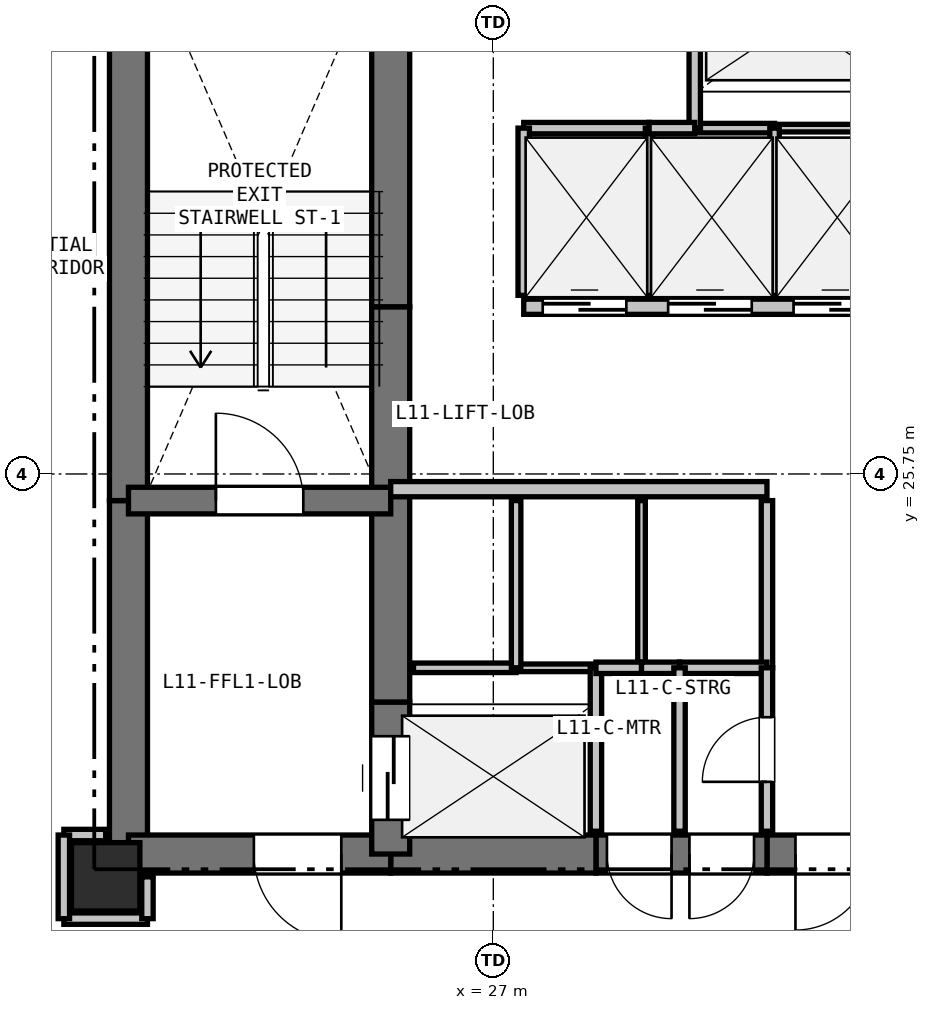
"""IFC4 building model, lengths in metres.
Left out: names, types, materials, properties, quantities, classifications, styles, units other than length and angle.
Written with IfcOpenShell. Run it as: python <this file> out.ifc"""

import sys

from ifc_helpers import new_model, si_unit, direction, frame, frame_2d, origin, origin_2d, place, context, subcontext, project, spatial, rectangle, extrude, element, fill, save


model = new_model("IFC4")
c1 = context("Model", 3, precision=1e-05, world=origin(), true_north=direction((0.0, 1.0)))
c2 = subcontext(c1, "Body", "Model", "MODEL_VIEW")
j1 = project(units=[si_unit("LENGTHUNIT", "METRE"), si_unit("PLANEANGLEUNIT", "RADIAN")], contexts=[c1])
p1 = place(None, origin())
s1 = spatial("IfcSite", under=j1, at=p1, CompositionType="ELEMENT")
p2 = place(p1, origin())
s2 = spatial("IfcBuilding", under=s1, at=p2, CompositionType="ELEMENT")
p3 = place(p2, frame((0.0, 0.0, 42.3)))
s3 = spatial("IfcBuildingStorey", under=s2, at=p3, CompositionType="ELEMENT", Elevation=42.3)
p4 = place(p3, frame((21.9, 20.45, 0.0), z_axis=(0.0, 0.0, 1.0), x_axis=(1.0, 0.0, 0.0)))
e1 = element("IfcColumn", 1, at=p4, inside=s3, PredefinedType="COLUMN", context=c2, shape_type="SweptSolid", body=[
    extrude(rectangle(XDim=0.9, YDim=0.9, at=origin_2d()), origin(), (0.0, 0.0, 1.0), 3.3),
])
p5 = place(p3, frame((22.2, 20.75, 0.0), z_axis=(0.0, 0.0, 1.0), x_axis=(0.0, 1.0, 0.0)))
e2 = element("IfcWall", 2, at=p5, inside=s3, PredefinedType="SHEAR", context=c2, shape_type="SweptSolid", body=[
    extrude(rectangle(XDim=4.65, YDim=0.5, at=frame_2d((2.325, 0.0))), origin(), (0.0, 0.0, 1.0), 3.04),
])
p6 = place(p3, frame((22.2, 25.4, 0.0), z_axis=(0.0, 0.0, 1.0), x_axis=(0.0, 1.0, 0.0)))
e3 = element("IfcWall", 3, at=p6, inside=s3, PredefinedType="SHEAR", context=c2, shape_type="SweptSolid", body=[
    extrude(rectangle(XDim=7.35, YDim=0.5, at=frame_2d((3.675, 0.0))), origin(), (0.0, 0.0, 1.0), 3.04),
])
p7 = place(p3, frame((32.35, 20.75, 0.0), z_axis=(0.0, 0.0, 1.0), x_axis=(-1.0, 0.0, 0.0)))
e4 = element("IfcWall", 4, at=p7, inside=s3, PredefinedType="SHEAR", context=c2, shape_type="SweptSolid", body=[
    extrude(rectangle(XDim=1.75, YDim=0.5, at=frame_2d((0.875, 0.0))), origin(), (0.0, 0.0, 1.0), 3.04),
])
p8 = place(p7, frame((0.375, 0.0, 0.0)))
e5 = element("IfcOpeningElement", 5, at=p8, cuts=e4, PredefinedType="OPENING", context=c2, shape_type="SweptSolid", body=[
    extrude(rectangle(XDim=1.0, YDim=2.15, at=frame_2d((0.5, 1.075))), frame((0.0, 0.26, 0.0), z_axis=(0.0, -1.0, 0.0), x_axis=(1.0, 0.0, 0.0)), (0.0, 0.0, 1.0), 0.52),
])
p9 = place(p3, frame((30.6, 20.75, 0.0), z_axis=(0.0, 0.0, 1.0), x_axis=(-1.0, 0.0, 0.0)))
e6 = element("IfcWall", 6, at=p9, inside=s3, PredefinedType="SHEAR", context=c2, shape_type="SweptSolid", body=[
    extrude(rectangle(XDim=2.25, YDim=0.5, at=frame_2d((1.125, 0.0))), origin(), (0.0, 0.0, 1.0), 3.04),
])
p10 = place(p9, frame((1.255, 0.0, 0.0)))
e7 = element("IfcOpeningElement", 7, at=p10, cuts=e6, PredefinedType="OPENING", context=c2, shape_type="SweptSolid", body=[
    extrude(rectangle(XDim=0.85, YDim=2.1, at=frame_2d((0.425, 1.05))), frame((0.0, 0.26, 0.0), z_axis=(0.0, -1.0, 0.0), x_axis=(1.0, 0.0, 0.0)), (0.0, 0.0, 1.0), 0.52),
])
p11 = place(p9, frame((0.17, 0.0, 0.0)))
e8 = element("IfcOpeningElement", 8, at=p11, cuts=e6, PredefinedType="OPENING", context=c2, shape_type="SweptSolid", body=[
    extrude(rectangle(XDim=0.85, YDim=2.1, at=frame_2d((0.425, 1.05))), frame((0.0, 0.26, 0.0), z_axis=(0.0, -1.0, 0.0), x_axis=(1.0, 0.0, 0.0)), (0.0, 0.0, 1.0), 0.52),
])
p12 = place(p3, frame((28.35, 20.75, 0.0), z_axis=(0.0, 0.0, 1.0), x_axis=(-1.0, 0.0, 0.0)))
e9 = element("IfcWall", 9, at=p12, inside=s3, PredefinedType="SHEAR", context=c2, shape_type="SweptSolid", body=[
    extrude(rectangle(XDim=2.7, YDim=0.5, at=frame_2d((1.35, 0.0))), origin(), (0.0, 0.0, 1.0), 3.04),
])
p13 = place(p3, frame((25.65, 20.75, 0.0), z_axis=(0.0, 0.0, 1.0), x_axis=(-1.0, 0.0, 0.0)))
e10 = element("IfcWall", 10, at=p13, inside=s3, PredefinedType="SHEAR", context=c2, shape_type="SweptSolid", body=[
    extrude(rectangle(XDim=3.45, YDim=0.5, at=frame_2d((1.725, 0.0))), origin(), (0.0, 0.0, 1.0), 3.04),
])
p14 = place(p13, frame((0.65, 0.0, 0.0)))
e11 = element("IfcOpeningElement", 11, at=p14, cuts=e10, PredefinedType="OPENING", context=c2, shape_type="SweptSolid", body=[
    extrude(rectangle(XDim=1.15, YDim=2.15, at=frame_2d((0.575, 1.075))), frame((0.0, 0.26, 0.0), z_axis=(0.0, -1.0, 0.0), x_axis=(1.0, 0.0, 0.0)), (0.0, 0.0, 1.0), 0.52),
])
p15 = place(p3, frame((25.65, 20.75, 0.0), z_axis=(0.0, 0.0, 1.0), x_axis=(0.0, 1.0, 0.0)))
e12 = element("IfcWall", 12, at=p15, inside=s3, PredefinedType="SHEAR", context=c2, shape_type="SweptSolid", body=[
    extrude(rectangle(XDim=2.0, YDim=0.5, at=frame_2d((1.0, 0.0))), origin(), (0.0, 0.0, 1.0), 3.04),
])
p16 = place(p15, frame((0.45, 0.0, 0.0)))
e13 = element("IfcOpeningElement", 13, at=p16, cuts=e12, PredefinedType="OPENING", context=c2, shape_type="SweptSolid", body=[
    extrude(rectangle(XDim=1.1, YDim=2.15, at=frame_2d((0.55, 1.075))), frame((0.0, 0.26, 0.0), z_axis=(0.0, -1.0, 0.0), x_axis=(1.0, 0.0, 0.0)), (0.0, 0.0, 1.0), 0.52),
])
p17 = place(p3, frame((25.65, 22.75, 0.0), z_axis=(0.0, 0.0, 1.0), x_axis=(0.0, 1.0, 0.0)))
e14 = element("IfcWall", 14, at=p17, inside=s3, PredefinedType="SHEAR", context=c2, shape_type="SweptSolid", body=[
    extrude(rectangle(XDim=2.8, YDim=0.5, at=frame_2d((1.4, 0.0))), origin(), (0.0, 0.0, 1.0), 3.04),
])
p18 = place(p3, frame((25.65, 25.55, 0.0), z_axis=(0.0, 0.0, 1.0), x_axis=(0.0, 1.0, 0.0)))
e15 = element("IfcWall", 15, at=p18, inside=s3, PredefinedType="SHEAR", context=c2, shape_type="SweptSolid", body=[
    extrude(rectangle(XDim=2.4, YDim=0.5, at=frame_2d((1.2, 0.0))), origin(), (0.0, 0.0, 1.0), 3.04),
])
p19 = place(p3, frame((25.65, 27.95, 0.0), z_axis=(0.0, 0.0, 1.0), x_axis=(0.0, 1.0, 0.0)))
e16 = element("IfcWall", 16, at=p19, inside=s3, PredefinedType="SHEAR", context=c2, shape_type="SweptSolid", body=[
    extrude(rectangle(XDim=4.8, YDim=0.5, at=frame_2d((2.4, 0.0))), origin(), (0.0, 0.0, 1.0), 3.04),
])
p20 = place(p3, frame((22.2, 25.4, 0.0), z_axis=(0.0, 0.0, 1.0), x_axis=(1.0, 0.0, 0.0)))
e17 = element("IfcWall", 17, at=p20, inside=s3, PredefinedType="SHEAR", context=c2, shape_type="SweptSolid", body=[
    extrude(rectangle(XDim=3.45, YDim=0.35, at=frame_2d((1.725, 0.0))), origin(), (0.0, 0.0, 1.0), 3.04),
])
p21 = place(p20, frame((1.15, 0.0, 0.0)))
e18 = element("IfcOpeningElement", 18, at=p21, cuts=e17, PredefinedType="OPENING", context=c2, shape_type="SweptSolid", body=[
    extrude(rectangle(XDim=1.15, YDim=2.15, at=frame_2d((0.575, 1.075))), frame((0.0, 0.185, 0.0), z_axis=(0.0, -1.0, 0.0), x_axis=(1.0, 0.0, 0.0)), (0.0, 0.0, 1.0), 0.37),
])
p22 = place(p3, frame((25.65, 25.55, 0.0), z_axis=(0.0, 0.0, 1.0), x_axis=(1.0, 0.0, 0.0)))
e19 = element("IfcWall", 19, at=p22, inside=s3, PredefinedType="PARTITIONING", context=c2, shape_type="SweptSolid", body=[
    extrude(rectangle(XDim=4.95, YDim=0.2, at=frame_2d((2.475, 0.0))), origin(), (0.0, 0.0, 1.0), 3.04),
])
p23 = place(p3, frame((27.4, 27.95, 0.0), z_axis=(0.0, 0.0, 1.0), x_axis=(1.0, 0.0, 0.0)))
e20 = element("IfcWall", 20, at=p23, inside=s3, PredefinedType="PARTITIONING", context=c2, shape_type="SweptSolid", body=[
    extrude(rectangle(XDim=4.95, YDim=0.2, at=frame_2d((2.475, 0.0))), origin(), (0.0, 0.0, 1.0), 3.04),
])
p24 = place(p23, frame((0.25, 0.0, 0.0)))
e21 = element("IfcOpeningElement", 21, at=p24, cuts=e20, PredefinedType="OPENING", context=c2, shape_type="SweptSolid", body=[
    extrude(rectangle(XDim=1.1, YDim=2.15, at=frame_2d((0.55, 1.075))), frame((0.0, 0.11, 0.0), z_axis=(0.0, -1.0, 0.0), x_axis=(1.0, 0.0, 0.0)), (0.0, 0.0, 1.0), 0.22),
])
p25 = place(p23, frame((1.9, 0.0, 0.0)))
e22 = element("IfcOpeningElement", 22, at=p25, cuts=e20, PredefinedType="OPENING", context=c2, shape_type="SweptSolid", body=[
    extrude(rectangle(XDim=1.1, YDim=2.15, at=frame_2d((0.55, 1.075))), frame((0.0, 0.11, 0.0), z_axis=(0.0, -1.0, 0.0), x_axis=(1.0, 0.0, 0.0)), (0.0, 0.0, 1.0), 0.22),
])
p26 = place(p23, frame((3.55, 0.0, 0.0)))
e23 = element("IfcOpeningElement", 23, at=p26, cuts=e20, PredefinedType="OPENING", context=c2, shape_type="SweptSolid", body=[
    extrude(rectangle(XDim=1.1, YDim=2.15, at=frame_2d((0.55, 1.075))), frame((0.0, 0.11, 0.0), z_axis=(0.0, -1.0, 0.0), x_axis=(1.0, 0.0, 0.0)), (0.0, 0.0, 1.0), 0.22),
])
p27 = place(p3, frame((25.95, 23.2, 0.0), z_axis=(0.0, 0.0, 1.0), x_axis=(1.0, 0.0, 0.0)))
e24 = element("IfcWall", 24, at=p27, inside=s3, PredefinedType="PARTITIONING", context=c2, shape_type="SweptSolid", body=[
    extrude(rectangle(XDim=1.35, YDim=0.125, at=frame_2d((0.675, 0.0))), origin(), (0.0, 0.0, 1.0), 3.04),
])
p28 = place(p3, frame((27.3, 23.2, 0.0), z_axis=(0.0, 0.0, 1.0), x_axis=(1.0, 0.0, 0.0)))
e25 = element("IfcWall", 25, at=p28, inside=s3, PredefinedType="PARTITIONING", context=c2, shape_type="SweptSolid", body=[
    extrude(rectangle(XDim=1.05, YDim=0.1, at=frame_2d((0.525, 0.0))), origin(), (0.0, 0.0, 1.0), 3.04),
])
p29 = place(p3, frame((28.35, 23.2, 0.0), z_axis=(0.0, 0.0, 1.0), x_axis=(0.0, -1.0, 0.0)))
e26 = element("IfcWall", 26, at=p29, inside=s3, PredefinedType="PARTITIONING", context=c2, shape_type="SweptSolid", body=[
    extrude(rectangle(XDim=2.15, YDim=0.15, at=frame_2d((1.075, 0.0))), origin(), (0.0, 0.0, 1.0), 3.04),
])
p30 = place(p3, frame((32.05, 30.3, 0.0), z_axis=(0.0, 0.0, 1.0), x_axis=(-1.0, 0.0, 0.0)))
e27 = element("IfcWall", 27, at=p30, inside=s3, PredefinedType="PARTITIONING", context=c2, shape_type="SweptSolid", body=[
    extrude(rectangle(XDim=1.35, YDim=0.1, at=frame_2d((0.675, 0.0))), origin(), (0.0, 0.0, 1.0), 3.04),
])
p31 = place(p3, frame((30.7, 30.3, 0.0), z_axis=(0.0, 0.0, 1.0), x_axis=(-1.0, 0.0, 0.0)))
e28 = element("IfcWall", 28, at=p31, inside=s3, PredefinedType="PARTITIONING", context=c2, shape_type="SweptSolid", body=[
    extrude(rectangle(XDim=1.05, YDim=0.125, at=frame_2d((0.525, 0.0))), origin(), (0.0, 0.0, 1.0), 3.04),
])
p32 = place(p3, frame((29.65, 30.3, 0.0), z_axis=(0.0, 0.0, 1.0), x_axis=(0.0, 1.0, 0.0)))
e29 = element("IfcWall", 29, at=p32, inside=s3, PredefinedType="PARTITIONING", context=c2, shape_type="SweptSolid", body=[
    extrude(rectangle(XDim=2.15, YDim=0.15, at=frame_2d((1.075, 0.0))), origin(), (0.0, 0.0, 1.0), 3.04),
])
p33 = place(p3, frame((27.3, 25.4, 0.0), z_axis=(0.0, 0.0, 1.0), x_axis=(0.0, -1.0, 0.0)))
e30 = element("IfcWall", 30, at=p33, inside=s3, PredefinedType="PARTITIONING", context=c2, shape_type="SweptSolid", body=[
    extrude(rectangle(XDim=2.2, YDim=0.125, at=frame_2d((1.1, 0.0))), origin(), (0.0, 0.0, 1.0), 3.04),
])
p34 = place(p3, frame((28.95, 25.4, 0.0), z_axis=(0.0, 0.0, 1.0), x_axis=(0.0, -1.0, 0.0)))
e31 = element("IfcWall", 31, at=p34, inside=s3, PredefinedType="PARTITIONING", context=c2, shape_type="SweptSolid", body=[
    extrude(rectangle(XDim=2.2, YDim=0.1, at=frame_2d((1.1, 0.0))), origin(), (0.0, 0.0, 1.0), 3.04),
])
p35 = place(p3, frame((28.95, 23.2, 0.0), z_axis=(0.0, 0.0, 1.0), x_axis=(-1.0, 0.0, 0.0)))
e32 = element("IfcWall", 32, at=p35, inside=s3, PredefinedType="PARTITIONING", context=c2, shape_type="SweptSolid", body=[
    extrude(rectangle(XDim=0.6, YDim=0.15, at=frame_2d((0.3, 0.0))), origin(), (0.0, 0.0, 1.0), 3.04),
])
p36 = place(p3, frame((30.6, 25.4, 0.0), z_axis=(0.0, 0.0, 1.0), x_axis=(0.0, -1.0, 0.0)))
e33 = element("IfcWall", 33, at=p36, inside=s3, PredefinedType="PARTITIONING", context=c2, shape_type="SweptSolid", body=[
    extrude(rectangle(XDim=2.2, YDim=0.15, at=frame_2d((1.1, 0.0))), origin(), (0.0, 0.0, 1.0), 3.04),
])
p37 = place(p3, frame((30.6, 23.2, 0.0), z_axis=(0.0, 0.0, 1.0), x_axis=(-1.0, 0.0, 0.0)))
e34 = element("IfcWall", 34, at=p37, inside=s3, PredefinedType="PARTITIONING", context=c2, shape_type="SweptSolid", body=[
    extrude(rectangle(XDim=1.15, YDim=0.15, at=frame_2d((0.575, 0.0))), origin(), (0.0, 0.0, 1.0), 3.04),
])
p38 = place(p3, frame((29.45, 23.2, 0.0), z_axis=(0.0, 0.0, 1.0), x_axis=(-1.0, 0.0, 0.0)))
e35 = element("IfcWall", 35, at=p38, inside=s3, PredefinedType="PARTITIONING", context=c2, shape_type="SweptSolid", body=[
    extrude(rectangle(XDim=0.5, YDim=0.15, at=frame_2d((0.25, 0.0))), origin(), (0.0, 0.0, 1.0), 3.04),
])
p39 = place(p3, frame((27.4, 30.3, 0.0), z_axis=(0.0, 0.0, 1.0), x_axis=(1.0, 0.0, 0.0)))
e36 = element("IfcWall", 36, at=p39, inside=s3, PredefinedType="PARTITIONING", context=c2, shape_type="SweptSolid", body=[
    extrude(rectangle(XDim=1.65, YDim=0.15, at=frame_2d((0.825, 0.0))), origin(), (0.0, 0.0, 1.0), 3.04),
])
p40 = place(p3, frame((29.05, 30.3, 0.0), z_axis=(0.0, 0.0, 1.0), x_axis=(0.0, -1.0, 0.0)))
e37 = element("IfcWall", 37, at=p40, inside=s3, PredefinedType="PARTITIONING", context=c2, shape_type="SweptSolid", body=[
    extrude(rectangle(XDim=2.2, YDim=0.1, at=frame_2d((1.1, 0.0))), origin(), (0.0, 0.0, 1.0), 3.04),
])
p41 = place(p3, frame((27.4, 28.1, 0.0), z_axis=(0.0, 0.0, 1.0), x_axis=(0.0, 1.0, 0.0)))
e38 = element("IfcWall", 38, at=p41, inside=s3, PredefinedType="PARTITIONING", context=c2, shape_type="SweptSolid", body=[
    extrude(rectangle(XDim=2.2, YDim=0.15, at=frame_2d((1.1, 0.0))), origin(), (0.0, 0.0, 1.0), 3.04),
])
p42 = place(p3, frame((29.05, 30.3, 0.0), z_axis=(0.0, 0.0, 1.0), x_axis=(1.0, 0.0, 0.0)))
e39 = element("IfcWall", 39, at=p42, inside=s3, PredefinedType="PARTITIONING", context=c2, shape_type="SweptSolid", body=[
    extrude(rectangle(XDim=0.6, YDim=0.15, at=frame_2d((0.3, 0.0))), origin(), (0.0, 0.0, 1.0), 3.04),
])
p43 = place(p3, frame((30.7, 30.3, 0.0), z_axis=(0.0, 0.0, 1.0), x_axis=(0.0, -1.0, 0.0)))
e40 = element("IfcWall", 40, at=p43, inside=s3, PredefinedType="PARTITIONING", context=c2, shape_type="SweptSolid", body=[
    extrude(rectangle(XDim=2.2, YDim=0.125, at=frame_2d((1.1, 0.0))), origin(), (0.0, 0.0, 1.0), 3.04),
])
p44 = place(p3, frame((30.6, 21.05, 0.0), z_axis=(0.0, 0.0, 1.0), x_axis=(0.0, 1.0, 0.0)))
e41 = element("IfcWall", 41, at=p44, inside=s3, PredefinedType="PARTITIONING", context=c2, shape_type="SweptSolid", body=[
    extrude(rectangle(XDim=2.15, YDim=0.15, at=frame_2d((1.075, 0.0))), origin(), (0.0, 0.0, 1.0), 3.04),
])
p45 = place(p44, frame((0.65, 0.0, 0.0)))
e42 = element("IfcOpeningElement", 42, at=p45, cuts=e41, PredefinedType="OPENING", context=c2, shape_type="SweptSolid", body=[
    extrude(rectangle(XDim=0.85, YDim=2.1, at=frame_2d((0.425, 1.05))), frame((0.0, 0.085, 0.0), z_axis=(0.0, -1.0, 0.0), x_axis=(1.0, 0.0, 0.0)), (0.0, 0.0, 1.0), 0.17),
])
p46 = place(p3, frame((21.35, 19.9, 0.0), z_axis=(0.0, 0.0, 1.0), x_axis=(1.0, 0.0, 0.0)))
e43 = element("IfcWall", 43, at=p46, inside=s3, PredefinedType="PARTITIONING", context=c2, shape_type="SweptSolid", body=[
    extrude(rectangle(XDim=1.1, YDim=0.15, at=frame_2d((0.55, 0.0))), origin(), (0.0, 0.0, 1.0), 2.337),
])
p47 = place(p3, frame((22.45, 19.9, 0.0), z_axis=(0.0, 0.0, 1.0), x_axis=(0.0, 1.0, 0.0)))
e44 = element("IfcWall", 44, at=p47, inside=s3, PredefinedType="PARTITIONING", context=c2, shape_type="SweptSolid", body=[
    extrude(rectangle(XDim=0.55, YDim=0.15, at=frame_2d((0.275, 0.0))), origin(), (0.0, 0.0, 1.0), 2.337),
])
p48 = place(p3, frame((21.9, 21.0, 0.0), z_axis=(0.0, 0.0, 1.0), x_axis=(-1.0, 0.0, 0.0)))
e45 = element("IfcWall", 45, at=p48, inside=s3, PredefinedType="PARTITIONING", context=c2, shape_type="SweptSolid", body=[
    extrude(rectangle(XDim=0.55, YDim=0.15, at=frame_2d((0.275, 0.0))), origin(), (0.0, 0.0, 1.0), 2.488),
])
p49 = place(p3, frame((21.35, 21.0, 0.0), z_axis=(0.0, 0.0, 1.0), x_axis=(0.0, -1.0, 0.0)))
e46 = element("IfcWall", 46, at=p49, inside=s3, PredefinedType="PARTITIONING", context=c2, shape_type="SweptSolid", body=[
    extrude(rectangle(XDim=1.1, YDim=0.15, at=frame_2d((0.55, 0.0))), origin(), (0.0, 0.0, 1.0), 2.337),
])
p50 = place(p3, frame((29.45, 23.2, 0.0), z_axis=(0.0, 0.0, 1.0), x_axis=(0.0, -1.0, 0.0)))
e47 = element("IfcWall", 47, at=p50, inside=s3, PredefinedType="PARTITIONING", context=c2, shape_type="SweptSolid", body=[
    extrude(rectangle(XDim=2.15, YDim=0.15, at=frame_2d((1.075, 0.0))), origin(), (0.0, 0.0, 1.0), 3.04),
])
p51 = place(p24, origin())
e48 = element("IfcDoor", 48, at=p51, inside=s3, OperationType="SLIDING_TO_LEFT", PredefinedType="DOOR", context=c2, shape_type="SweptSolid", body=[
    extrude(rectangle(XDim=1.1, YDim=2.15, at=frame_2d((0.55, 1.075))), frame((0.0, 0.025, 0.0), z_axis=(0.0, -1.0, 0.0), x_axis=(1.0, 0.0, 0.0)), (0.0, 0.0, 1.0), 0.05),
])
fill(e21, e48)
p52 = place(p25, origin())
e49 = element("IfcDoor", 49, at=p52, inside=s3, OperationType="SLIDING_TO_LEFT", PredefinedType="DOOR", context=c2, shape_type="SweptSolid", body=[
    extrude(rectangle(XDim=1.1, YDim=2.15, at=frame_2d((0.55, 1.075))), frame((0.0, 0.025, 0.0), z_axis=(0.0, -1.0, 0.0), x_axis=(1.0, 0.0, 0.0)), (0.0, 0.0, 1.0), 0.05),
])
fill(e22, e49)
p53 = place(p26, origin())
e50 = element("IfcDoor", 50, at=p53, inside=s3, OperationType="SLIDING_TO_LEFT", PredefinedType="DOOR", context=c2, shape_type="SweptSolid", body=[
    extrude(rectangle(XDim=1.1, YDim=2.15, at=frame_2d((0.55, 1.075))), frame((0.0, 0.025, 0.0), z_axis=(0.0, -1.0, 0.0), x_axis=(1.0, 0.0, 0.0)), (0.0, 0.0, 1.0), 0.05),
])
fill(e23, e50)
p54 = place(p8, origin())
e51 = element("IfcDoor", 51, at=p54, inside=s3, OperationType="SINGLE_SWING_RIGHT", PredefinedType="DOOR", context=c2, shape_type="SweptSolid", body=[
    extrude(rectangle(XDim=1.0, YDim=2.15, at=frame_2d((0.5, 1.075))), frame((0.0, 0.025, 0.0), z_axis=(0.0, -1.0, 0.0), x_axis=(1.0, 0.0, 0.0)), (0.0, 0.0, 1.0), 0.05),
])
fill(e5, e51)
p55 = place(p16, origin())
e52 = element("IfcDoor", 52, at=p55, inside=s3, OperationType="SLIDING_TO_LEFT", PredefinedType="DOOR", context=c2, shape_type="SweptSolid", body=[
    extrude(rectangle(XDim=1.1, YDim=2.15, at=frame_2d((0.55, 1.075))), frame((0.0, 0.025, 0.0), z_axis=(0.0, -1.0, 0.0), x_axis=(1.0, 0.0, 0.0)), (0.0, 0.0, 1.0), 0.05),
])
fill(e13, e52)
p56 = place(p21, origin())
e53 = element("IfcDoor", 53, at=p56, inside=s3, OperationType="SINGLE_SWING_LEFT", PredefinedType="DOOR", context=c2, shape_type="SweptSolid", body=[
    extrude(rectangle(XDim=1.15, YDim=2.15, at=frame_2d((0.575, 1.075))), frame((0.0, 0.025, 0.0), z_axis=(0.0, -1.0, 0.0), x_axis=(1.0, 0.0, 0.0)), (0.0, 0.0, 1.0), 0.05),
])
fill(e18, e53)
p57 = place(p14, origin())
e54 = element("IfcDoor", 54, at=p57, inside=s3, OperationType="SINGLE_SWING_LEFT", PredefinedType="DOOR", context=c2, shape_type="SweptSolid", body=[
    extrude(rectangle(XDim=1.15, YDim=2.15, at=frame_2d((0.575, 1.075))), frame((0.0, 0.025, 0.0), z_axis=(0.0, -1.0, 0.0), x_axis=(1.0, 0.0, 0.0)), (0.0, 0.0, 1.0), 0.05),
])
fill(e11, e54)
p58 = place(p45, origin())
e55 = element("IfcDoor", 55, at=p58, inside=s3, OperationType="SINGLE_SWING_LEFT", PredefinedType="DOOR", context=c2, shape_type="SweptSolid", body=[
    extrude(rectangle(XDim=0.85, YDim=2.1, at=frame_2d((0.425, 1.05))), frame((0.0, 0.025, 0.0), z_axis=(0.0, -1.0, 0.0), x_axis=(1.0, 0.0, 0.0)), (0.0, 0.0, 1.0), 0.05),
])
fill(e42, e55)
p59 = place(p10, origin())
e56 = element("IfcDoor", 56, at=p59, inside=s3, OperationType="SINGLE_SWING_LEFT", PredefinedType="DOOR", context=c2, shape_type="SweptSolid", body=[
    extrude(rectangle(XDim=0.85, YDim=2.1, at=frame_2d((0.425, 1.05))), frame((0.0, 0.025, 0.0), z_axis=(0.0, -1.0, 0.0), x_axis=(1.0, 0.0, 0.0)), (0.0, 0.0, 1.0), 0.05),
])
fill(e7, e56)
p60 = place(p11, origin())
e57 = element("IfcDoor", 57, at=p60, inside=s3, OperationType="SINGLE_SWING_RIGHT", PredefinedType="DOOR", context=c2, shape_type="SweptSolid", body=[
    extrude(rectangle(XDim=0.85, YDim=2.1, at=frame_2d((0.425, 1.05))), frame((0.0, 0.025, 0.0), z_axis=(0.0, -1.0, 0.0), x_axis=(1.0, 0.0, 0.0)), (0.0, 0.0, 1.0), 0.05),
])
fill(e8, e57)
save(model, sys.argv[1])
